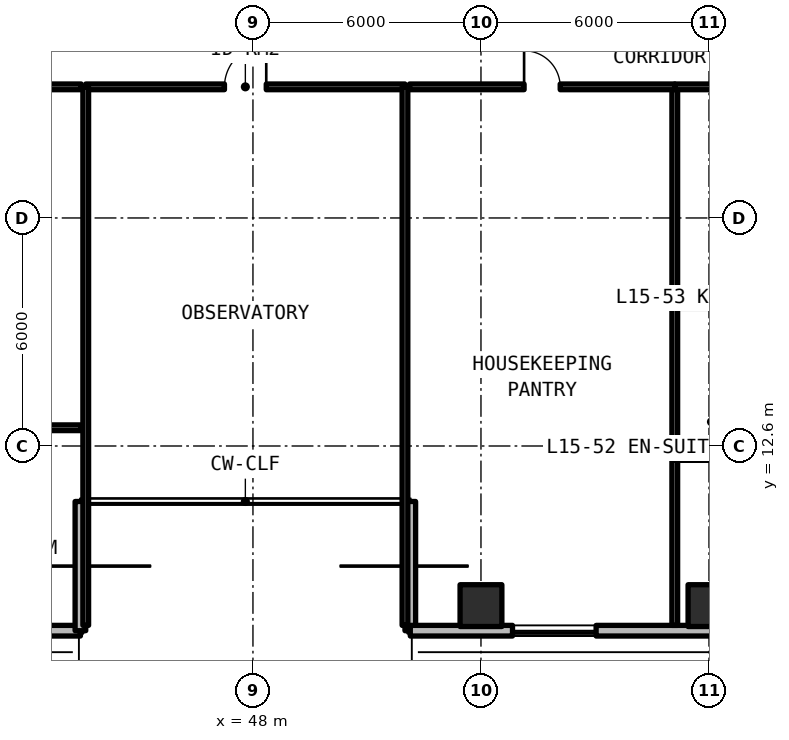
"""IFC4 building model, lengths in metres.
Left out: names, types, materials, properties, quantities, classifications, styles, units other than length and angle.
Written with IfcOpenShell. Run it as: python <this file> out.ifc"""

import sys

from ifc_helpers import new_model, si_unit, direction, frame, frame_2d, origin, origin_2d, place, context, subcontext, project, spatial, rectangle, extrude, element, fill, save


model = new_model("IFC4")
c1 = context("Model", 3, precision=1e-05, world=origin(), true_north=direction((0.0, 1.0)))
c2 = subcontext(c1, "Body", "Model", "MODEL_VIEW")
j1 = project(units=[si_unit("LENGTHUNIT", "METRE"), si_unit("PLANEANGLEUNIT", "RADIAN")], contexts=[c1])
p1 = place(None, origin())
s1 = spatial("IfcSite", under=j1, at=p1, CompositionType="ELEMENT")
p2 = place(p1, origin())
s2 = spatial("IfcBuilding", under=s1, at=p2, CompositionType="ELEMENT")
p3 = place(p2, frame((0.0, 0.0, 55.44)))
s3 = spatial("IfcBuildingStorey", under=s2, at=p3, CompositionType="ELEMENT", Elevation=55.44)
for number, where, z_axis, x_axis in (
    (1, (54.0, 8.4, 0.0), (0.0, 0.0, 1.0), (1.0, 0.0, 0.0)),
    (2, (60.0, 8.4, 0.0), (0.0, 0.0, 1.0), (1.0, 0.0, 0.0)),
):
    element("IfcColumn", number, at=place(p3, frame(where, z_axis=z_axis, x_axis=x_axis)), inside=s3, PredefinedType="COLUMN", context=c2, shape_type="SweptSolid", body=[
        extrude(rectangle(XDim=1.1, YDim=1.1, at=origin_2d()), origin(), (0.0, 0.0, 1.0), 3.3),
    ])
p4 = place(p3, frame((20.858, 7.74, 0.0), z_axis=(0.0, 0.0, 1.0), x_axis=(1.0, 0.0, 0.0)))
e3 = element("IfcWall", 3, at=p4, inside=s3, PredefinedType="SOLIDWALL", context=c2, shape_type="SweptSolid", body=[
    extrude(rectangle(XDim=22.602, YDim=0.28, at=frame_2d((11.301, 0.0))), origin(), (0.0, 0.0, 1.0), 3.08),
])
p5 = place(p4, frame((10.992, 0.0, 0.0)))
e4 = element("IfcOpeningElement", 4, at=p5, cuts=e3, PredefinedType="OPENING", context=c2, shape_type="SweptSolid", body=[
    extrude(rectangle(XDim=1.1, YDim=2.15, at=frame_2d((0.55, 1.075))), frame((0.0, 0.15, 0.0), z_axis=(0.0, -1.0, 0.0), x_axis=(1.0, 0.0, 0.0)), (0.0, 0.0, 1.0), 0.3),
])
p6 = place(p4, frame((0.903, 0.0, 0.78)))
e5 = element("IfcOpeningElement", 5, at=p6, cuts=e3, PredefinedType="OPENING", context=c2, shape_type="SweptSolid", body=[
    extrude(rectangle(XDim=1.4, YDim=1.65, at=frame_2d((0.7, 0.825))), frame((0.0, 0.15, 0.0), z_axis=(0.0, -1.0, 0.0), x_axis=(1.0, 0.0, 0.0)), (0.0, 0.0, 1.0), 0.3),
])
p7 = place(p4, frame((6.085, 0.0, 0.78)))
e6 = element("IfcOpeningElement", 6, at=p7, cuts=e3, PredefinedType="OPENING", context=c2, shape_type="SweptSolid", body=[
    extrude(rectangle(XDim=2.2, YDim=1.66, at=frame_2d((1.1, 0.83))), frame((0.0, 0.15, 0.0), z_axis=(0.0, -1.0, 0.0), x_axis=(1.0, 0.0, 0.0)), (0.0, 0.0, 1.0), 0.3),
])
p8 = place(p4, frame((15.997, 0.0, 0.78)))
e7 = element("IfcOpeningElement", 7, at=p8, cuts=e3, PredefinedType="OPENING", context=c2, shape_type="SweptSolid", body=[
    extrude(rectangle(XDim=2.2, YDim=1.66, at=frame_2d((1.1, 0.83))), frame((0.0, 0.15, 0.0), z_axis=(0.0, -1.0, 0.0), x_axis=(1.0, 0.0, 0.0)), (0.0, 0.0, 1.0), 0.3),
])
p9 = place(p4, frame((19.682, 0.0, 0.78)))
e8 = element("IfcOpeningElement", 8, at=p9, cuts=e3, PredefinedType="OPENING", context=c2, shape_type="SweptSolid", body=[
    extrude(rectangle(XDim=0.85, YDim=1.65, at=frame_2d((0.425, 0.825))), frame((0.0, 0.15, 0.0), z_axis=(0.0, -1.0, 0.0), x_axis=(1.0, 0.0, 0.0)), (0.0, 0.0, 1.0), 0.3),
])
for number, where, z_axis, x_axis in (
    (9, (43.46, 7.74, 0.0), (0.0, 0.0, 1.0), (0.0, 1.0, 0.0)),
    (10, (52.14, 11.14, 0.0), (0.0, 0.0, 1.0), (0.0, -1.0, 0.0)),
):
    element("IfcWall", number, at=place(p3, frame(where, z_axis=z_axis, x_axis=x_axis)), inside=s3, PredefinedType="SOLIDWALL", context=c2, shape_type="SweptSolid", body=[
        extrude(rectangle(XDim=3.4, YDim=0.28, at=frame_2d((1.7, 0.0))), origin(), (0.0, 0.0, 1.0), 3.08),
    ])
p10 = place(p3, frame((52.14, 7.74, 0.0), z_axis=(0.0, 0.0, 1.0), x_axis=(1.0, 0.0, 0.0)))
e11 = element("IfcWall", 11, at=p10, inside=s3, PredefinedType="SOLIDWALL", context=c2, shape_type="SweptSolid", body=[
    extrude(rectangle(XDim=44.402, YDim=0.28, at=frame_2d((22.201, 0.0))), origin(), (0.0, 0.0, 1.0), 3.08),
])
p11 = place(p10, frame((11.01, 0.0, 0.0)))
e12 = element("IfcOpeningElement", 12, at=p11, cuts=e11, PredefinedType="OPENING", context=c2, shape_type="SweptSolid", body=[
    extrude(rectangle(XDim=1.1, YDim=2.15, at=frame_2d((0.55, 1.075))), frame((0.0, 0.15, 0.0), z_axis=(0.0, -1.0, 0.0), x_axis=(1.0, 0.0, 0.0)), (0.0, 0.0, 1.0), 0.3),
])
p12 = place(p10, frame((22.86, 0.0, 0.0)))
e13 = element("IfcOpeningElement", 13, at=p12, cuts=e11, PredefinedType="OPENING", context=c2, shape_type="SweptSolid", body=[
    extrude(rectangle(XDim=1.1, YDim=2.15, at=frame_2d((0.55, 1.075))), frame((0.0, 0.15, 0.0), z_axis=(0.0, -1.0, 0.0), x_axis=(1.0, 0.0, 0.0)), (0.0, 0.0, 1.0), 0.3),
])
p13 = place(p10, frame((34.96, 0.0, 0.0)))
e14 = element("IfcOpeningElement", 14, at=p13, cuts=e11, PredefinedType="OPENING", context=c2, shape_type="SweptSolid", body=[
    extrude(rectangle(XDim=1.1, YDim=2.15, at=frame_2d((0.55, 1.075))), frame((0.0, 0.15, 0.0), z_axis=(0.0, -1.0, 0.0), x_axis=(1.0, 0.0, 0.0)), (0.0, 0.0, 1.0), 0.3),
])
p14 = place(p10, frame((2.69, 0.0, 0.78)))
e15 = element("IfcOpeningElement", 15, at=p14, cuts=e11, PredefinedType="OPENING", context=c2, shape_type="SweptSolid", body=[
    extrude(rectangle(XDim=2.2, YDim=1.66, at=frame_2d((1.1, 0.83))), frame((0.0, 0.15, 0.0), z_axis=(0.0, -1.0, 0.0), x_axis=(1.0, 0.0, 0.0)), (0.0, 0.0, 1.0), 0.3),
])
p15 = place(p10, frame((15.61, 0.0, 0.78)))
e16 = element("IfcOpeningElement", 16, at=p15, cuts=e11, PredefinedType="OPENING", context=c2, shape_type="SweptSolid", body=[
    extrude(rectangle(XDim=2.2, YDim=1.66, at=frame_2d((1.1, 0.83))), frame((0.0, 0.15, 0.0), z_axis=(0.0, -1.0, 0.0), x_axis=(1.0, 0.0, 0.0)), (0.0, 0.0, 1.0), 0.3),
])
p16 = place(p10, frame((28.241, 0.0, 0.78)))
e17 = element("IfcOpeningElement", 17, at=p16, cuts=e11, PredefinedType="OPENING", context=c2, shape_type="SweptSolid", body=[
    extrude(rectangle(XDim=2.2, YDim=1.66, at=frame_2d((1.1, 0.83))), frame((0.0, 0.15, 0.0), z_axis=(0.0, -1.0, 0.0), x_axis=(1.0, 0.0, 0.0)), (0.0, 0.0, 1.0), 0.3),
])
p17 = place(p3, frame((43.6, 22.05, 0.0), z_axis=(0.0, 0.0, 1.0), x_axis=(1.0, 0.0, 0.0)))
e18 = element("IfcWall", 18, at=p17, inside=s3, PredefinedType="SOLIDWALL", context=c2, shape_type="SweptSolid", body=[
    extrude(rectangle(XDim=8.4, YDim=0.15, at=frame_2d((4.2, 0.0))), origin(), (0.0, 0.0, 1.0), 2.35),
])
p18 = place(p17, frame((3.65, 0.0, 0.0)))
e19 = element("IfcOpeningElement", 19, at=p18, cuts=e18, PredefinedType="OPENING", context=c2, shape_type="SweptSolid", body=[
    extrude(rectangle(XDim=1.1, YDim=2.15, at=frame_2d((0.55, 1.075))), frame((0.0, 0.085, 0.0), z_axis=(0.0, -1.0, 0.0), x_axis=(1.0, 0.0, 0.0)), (0.0, 0.0, 1.0), 0.17),
])
for number, where, z_axis, x_axis in (
    (20, (43.6, 7.88, 0.0), (0.0, 0.0, 1.0), (0.0, 1.0, 0.0)),
    (21, (52.0, 7.88, 0.0), (0.0, 0.0, 1.0), (0.0, 1.0, 0.0)),
):
    element("IfcWall", number, at=place(p3, frame(where, z_axis=z_axis, x_axis=x_axis)), inside=s3, PredefinedType="SOLIDWALL", context=c2, shape_type="SweptSolid", body=[
        extrude(rectangle(XDim=14.17, YDim=0.15, at=frame_2d((7.085, 0.0))), origin(), (0.0, 0.0, 1.0), 2.35),
    ])
p19 = place(p3, frame((35.82, 13.08, 0.0), z_axis=(0.0, 0.0, 1.0), x_axis=(1.0, 0.0, 0.0)))
e22 = element("IfcWall", 22, at=p19, inside=s3, PredefinedType="PARTITIONING", context=c2, shape_type="SweptSolid", body=[
    extrude(rectangle(XDim=7.66, YDim=0.15, at=frame_2d((3.83, 0.0))), origin(), (0.0, 0.0, 1.0), 2.35),
])
p20 = place(p19, frame((2.875, 0.0, 0.0)))
e23 = element("IfcOpeningElement", 23, at=p20, cuts=e22, PredefinedType="OPENING", context=c2, shape_type="SweptSolid", body=[
    extrude(rectangle(XDim=0.85, YDim=2.1, at=frame_2d((0.425, 1.05))), frame((0.0, 0.085, 0.0), z_axis=(0.0, -1.0, 0.0), x_axis=(1.0, 0.0, 0.0)), (0.0, 0.0, 1.0), 0.17),
])
p21 = place(p19, frame((5.53, 0.0, 0.0)))
e24 = element("IfcOpeningElement", 24, at=p21, cuts=e22, PredefinedType="OPENING", context=c2, shape_type="SweptSolid", body=[
    extrude(rectangle(XDim=0.85, YDim=2.1, at=frame_2d((0.425, 1.05))), frame((0.0, 0.085, 0.0), z_axis=(0.0, -1.0, 0.0), x_axis=(1.0, 0.0, 0.0)), (0.0, 0.0, 1.0), 0.17),
])
p22 = place(p3, frame((35.82, 22.05, 0.0), z_axis=(0.0, 0.0, 1.0), x_axis=(1.0, 0.0, 0.0)))
e25 = element("IfcWall", 25, at=p22, inside=s3, PredefinedType="SOLIDWALL", context=c2, shape_type="SweptSolid", body=[
    extrude(rectangle(XDim=7.66, YDim=0.15, at=frame_2d((3.83, 0.0))), origin(), (0.0, 0.0, 1.0), 2.35),
])
p23 = place(p22, frame((4.57, 0.0, 0.0)))
e26 = element("IfcOpeningElement", 26, at=p23, cuts=e25, PredefinedType="OPENING", context=c2, shape_type="SweptSolid", body=[
    extrude(rectangle(XDim=0.95, YDim=2.15, at=frame_2d((0.475, 1.075))), frame((0.0, 0.085, 0.0), z_axis=(0.0, -1.0, 0.0), x_axis=(1.0, 0.0, 0.0)), (0.0, 0.0, 1.0), 0.17),
])
p24 = place(p3, frame((59.1, 7.88, 0.0), z_axis=(0.0, 0.0, 1.0), x_axis=(0.0, 1.0, 0.0)))
e27 = element("IfcWall", 27, at=p24, inside=s3, PredefinedType="SOLIDWALL", context=c2, shape_type="SweptSolid", body=[
    extrude(rectangle(XDim=14.17, YDim=0.15, at=frame_2d((7.085, 0.0))), origin(), (0.0, 0.0, 1.0), 2.35),
])
p25 = place(p3, frame((52.12, 22.05, 0.0), z_axis=(0.0, 0.0, 1.0), x_axis=(1.0, 0.0, 0.0)))
e28 = element("IfcWall", 28, at=p25, inside=s3, PredefinedType="SOLIDWALL", context=c2, shape_type="SweptSolid", body=[
    extrude(rectangle(XDim=6.98, YDim=0.15, at=frame_2d((3.49, 0.0))), origin(), (0.0, 0.0, 1.0), 2.35),
])
p26 = place(p25, frame((3.015, 0.0, 0.0)))
e29 = element("IfcOpeningElement", 29, at=p26, cuts=e28, PredefinedType="OPENING", context=c2, shape_type="SweptSolid", body=[
    extrude(rectangle(XDim=0.95, YDim=2.15, at=frame_2d((0.475, 1.075))), frame((0.0, 0.085, 0.0), z_axis=(0.0, -1.0, 0.0), x_axis=(1.0, 0.0, 0.0)), (0.0, 0.0, 1.0), 0.17),
])
p27 = place(p3, frame((59.1, 16.296, 0.0), z_axis=(0.0, 0.0, 1.0), x_axis=(1.0, 0.0, 0.0)))
e30 = element("IfcWall", 30, at=p27, inside=s3, PredefinedType="PARTITIONING", context=c2, shape_type="SweptSolid", body=[
    extrude(rectangle(XDim=2.82, YDim=0.15, at=frame_2d((1.41, 0.0))), origin(), (0.0, 0.0, 1.0), 2.35),
])
p28 = place(p3, frame((59.1, 12.297, 0.0), z_axis=(0.0, 0.0, 1.0), x_axis=(1.0, 0.0, 0.0)))
e31 = element("IfcWall", 31, at=p28, inside=s3, PredefinedType="PARTITIONING", context=c2, shape_type="SweptSolid", body=[
    extrude(rectangle(XDim=12.843, YDim=0.15, at=frame_2d((6.421, 0.0))), origin(), (0.0, 0.0, 1.0), 2.35),
])
p29 = place(p28, frame((4.324, 0.0, 0.0)))
e32 = element("IfcOpeningElement", 32, at=p29, cuts=e31, PredefinedType="OPENING", context=c2, shape_type="SweptSolid", body=[
    extrude(rectangle(XDim=0.85, YDim=2.1, at=frame_2d((0.425, 1.05))), frame((0.0, 0.085, 0.0), z_axis=(0.0, -1.0, 0.0), x_axis=(1.0, 0.0, 0.0)), (0.0, 0.0, 1.0), 0.17),
])
p30 = place(p28, frame((9.336, 0.0, 0.0)))
e33 = element("IfcOpeningElement", 33, at=p30, cuts=e31, PredefinedType="OPENING", context=c2, shape_type="SweptSolid", body=[
    extrude(rectangle(XDim=0.85, YDim=2.1, at=frame_2d((0.425, 1.05))), frame((0.0, 0.085, 0.0), z_axis=(0.0, -1.0, 0.0), x_axis=(1.0, 0.0, 0.0)), (0.0, 0.0, 1.0), 0.17),
])
p31 = place(p3, frame((59.1, 22.05, 0.0), z_axis=(0.0, 0.0, 1.0), x_axis=(1.0, 0.0, 0.0)))
e34 = element("IfcWall", 34, at=p31, inside=s3, PredefinedType="SOLIDWALL", context=c2, shape_type="SweptSolid", body=[
    extrude(rectangle(XDim=12.843, YDim=0.15, at=frame_2d((6.421, 0.0))), origin(), (0.0, 0.0, 1.0), 2.35),
])
p32 = place(p31, frame((4.916, 0.0, 0.0)))
e35 = element("IfcOpeningElement", 35, at=p32, cuts=e34, PredefinedType="OPENING", context=c2, shape_type="SweptSolid", body=[
    extrude(rectangle(XDim=0.95, YDim=2.15, at=frame_2d((0.475, 1.075))), frame((0.0, 0.085, 0.0), z_axis=(0.0, -1.0, 0.0), x_axis=(1.0, 0.0, 0.0)), (0.0, 0.0, 1.0), 0.17),
])
p33 = place(p14, origin())
e36 = element("IfcWindow", 36, at=p33, inside=s3, PartitioningType="SINGLE_PANEL", PredefinedType="WINDOW", context=c2, shape_type="SweptSolid", body=[
    extrude(rectangle(XDim=2.2, YDim=1.66, at=frame_2d((1.1, 0.83))), frame((0.0, 0.03, 0.0), z_axis=(0.0, -1.0, 0.0), x_axis=(1.0, 0.0, 0.0)), (0.0, 0.0, 1.0), 0.06),
])
fill(e15, e36)
p34 = place(p18, origin())
e37 = element("IfcDoor", 37, at=p34, inside=s3, OperationType="SINGLE_SWING_RIGHT", PredefinedType="DOOR", context=c2, shape_type="SweptSolid", body=[
    extrude(rectangle(XDim=1.1, YDim=2.15, at=frame_2d((0.55, 1.075))), frame((0.0, 0.025, 0.0), z_axis=(0.0, -1.0, 0.0), x_axis=(1.0, 0.0, 0.0)), (0.0, 0.0, 1.0), 0.05),
])
fill(e19, e37)
p35 = place(p26, origin())
e38 = element("IfcDoor", 38, at=p35, inside=s3, OperationType="SINGLE_SWING_LEFT", PredefinedType="DOOR", context=c2, shape_type="SweptSolid", body=[
    extrude(rectangle(XDim=0.95, YDim=2.15, at=frame_2d((0.475, 1.075))), frame((0.0, 0.025, 0.0), z_axis=(0.0, -1.0, 0.0), x_axis=(1.0, 0.0, 0.0)), (0.0, 0.0, 1.0), 0.05),
])
fill(e29, e38)
save(model, sys.argv[1])
